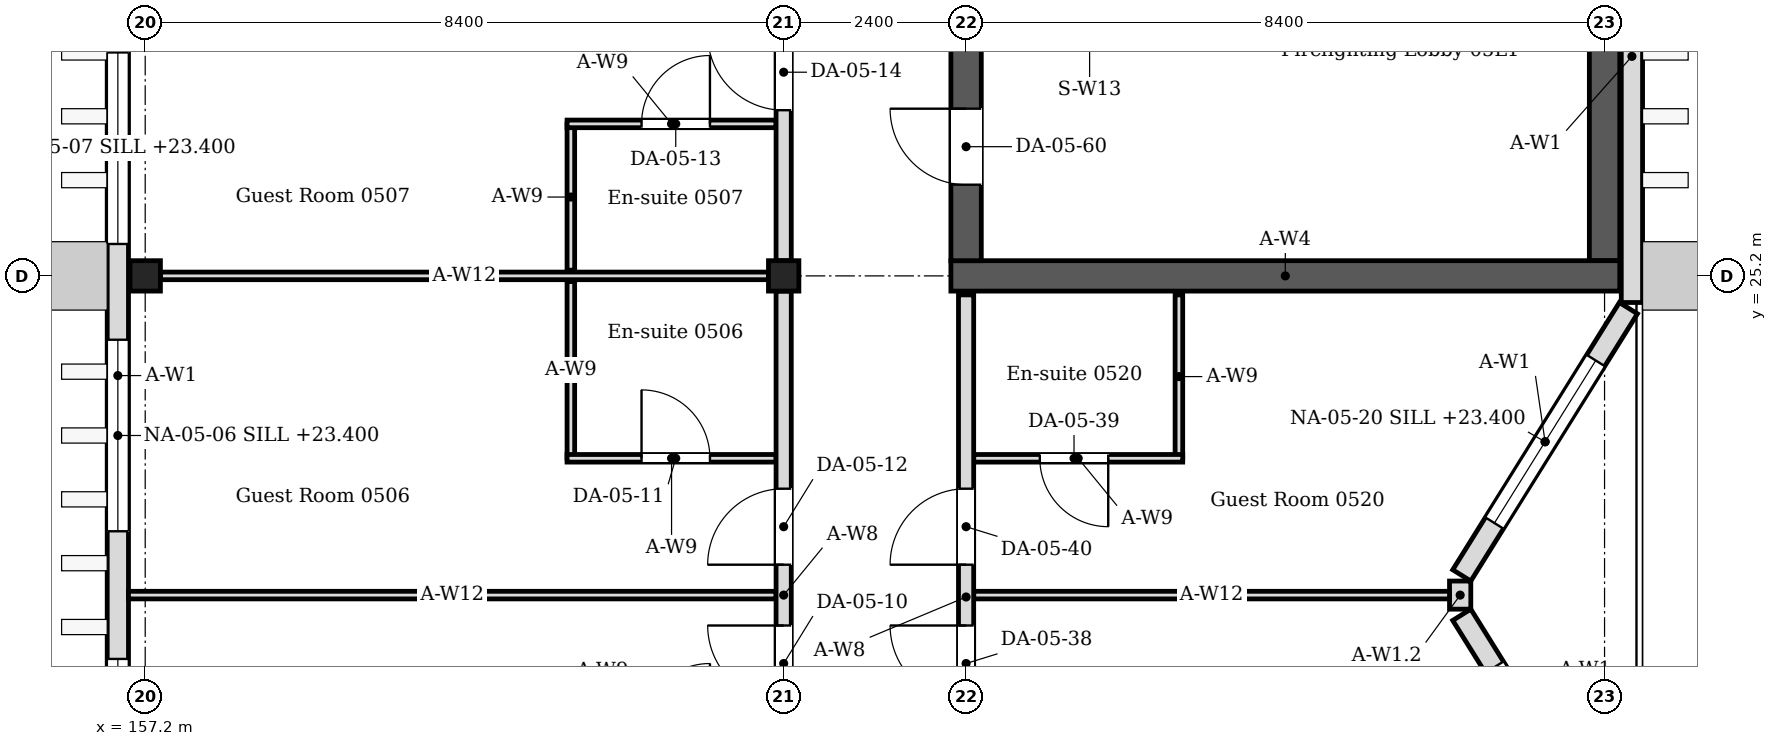
"""IFC4 building model, lengths in metres.
Left out: names, types, materials, properties, quantities, classifications, styles, units other than length and angle.
Written with IfcOpenShell. Run it as: python <this file> out.ifc"""

import sys

from ifc_helpers import new_model, si_unit, direction, frame, frame_2d, origin, origin_2d, place, context, subcontext, project, spatial, rectangle, i_section, extrude, element, fill, save


model = new_model("IFC4")
c1 = context("Model", 3, precision=1e-05, world=origin(), true_north=direction((0.0, 1.0)))
c2 = subcontext(c1, "Body", "Model", "MODEL_VIEW")
j1 = project(units=[si_unit("LENGTHUNIT", "METRE"), si_unit("PLANEANGLEUNIT", "RADIAN")], contexts=[c1])
p1 = place(None, origin())
s1 = spatial("IfcSite", under=j1, at=p1, CompositionType="ELEMENT")
p2 = place(p1, origin())
s2 = spatial("IfcBuilding", under=s1, at=p2, CompositionType="ELEMENT")
p3 = place(p2, frame((0.0, 0.0, 22.8)))
s3 = spatial("IfcBuildingStorey", under=s2, at=p3, CompositionType="ELEMENT", Elevation=22.8)
for number, where, z_axis, x_axis in (
    (1, (157.2, 25.2, 0.0), (0.0, 0.0, 1.0), (1.0, 0.0, 0.0)),
    (2, (165.6, 25.2, 0.0), (0.0, 0.0, 1.0), (1.0, 0.0, 0.0)),
):
    element("IfcColumn", number, at=place(p3, frame(where, z_axis=z_axis, x_axis=x_axis)), inside=s3, PredefinedType="COLUMN", context=c2, shape_type="SweptSolid", body=[
        extrude(i_section(OverallWidth=0.4, OverallDepth=0.4, WebThickness=0.013, FlangeThickness=0.021, FilletRadius=0.022, at=origin_2d()), origin(), (0.0, 0.0, 1.0), 4.2),
    ])
p4 = place(p3, frame((167.8, 25.2, 0.0), z_axis=(0.0, 0.0, 1.0), x_axis=(1.0, 0.0, 0.0)))
e3 = element("IfcWall", 3, at=p4, inside=s3, PredefinedType="SOLIDWALL", context=c2, shape_type="SweptSolid", body=[
    extrude(rectangle(XDim=8.8, YDim=0.4, at=frame_2d((4.4, 0.0))), origin(), (0.0, 0.0, 1.0), 4.05),
])
p5 = place(p3, frame((168.0, 25.4, 0.0), z_axis=(0.0, 0.0, 1.0), x_axis=(0.0, 1.0, 0.0)))
e4 = element("IfcWall", 4, at=p5, inside=s3, PredefinedType="SOLIDWALL", context=c2, shape_type="SweptSolid", body=[
    extrude(rectangle(XDim=16.4, YDim=0.4, at=frame_2d((8.2, 0.0))), origin(), (0.0, 0.0, 1.0), 4.05),
])
p6 = place(p5, frame((1.0, 0.0, 0.0)))
e5 = element("IfcOpeningElement", 5, at=p6, cuts=e4, PredefinedType="OPENING", context=c2, shape_type="SweptSolid", body=[
    extrude(rectangle(XDim=1.0, YDim=2.1, at=frame_2d((0.5, 1.05))), frame((0.0, 0.21, 0.0), z_axis=(0.0, -1.0, 0.0), x_axis=(1.0, 0.0, 0.0)), (0.0, 0.0, 1.0), 0.42),
])
p7 = place(p5, frame((14.4, 0.0, 0.0)))
e6 = element("IfcOpeningElement", 6, at=p7, cuts=e4, PredefinedType="OPENING", context=c2, shape_type="SweptSolid", body=[
    extrude(rectangle(XDim=1.4, YDim=2.1, at=frame_2d((0.7, 1.05))), frame((0.0, 0.21, 0.0), z_axis=(0.0, -1.0, 0.0), x_axis=(1.0, 0.0, 0.0)), (0.0, 0.0, 1.0), 0.42),
])
p8 = place(p3, frame((176.4, 25.4, 0.0), z_axis=(0.0, 0.0, 1.0), x_axis=(0.0, 1.0, 0.0)))
e7 = element("IfcWall", 7, at=p8, inside=s3, PredefinedType="SOLIDWALL", context=c2, shape_type="SweptSolid", body=[
    extrude(rectangle(XDim=16.4, YDim=0.4, at=frame_2d((8.2, 0.0))), origin(), (0.0, 0.0, 1.0), 4.05),
])
p9 = place(p3, frame((156.84, 16.45, 0.0), z_axis=(0.0, 0.0, 1.0), x_axis=(0.0, 1.0, 0.0)))
e8 = element("IfcWall", 8, at=p9, inside=s3, PredefinedType="SOLIDWALL", context=c2, shape_type="SweptSolid", body=[
    extrude(rectangle(XDim=25.9, YDim=0.28, at=frame_2d((12.95, 0.0))), origin(), (0.0, 0.0, 1.0), 4.05),
])
p10 = place(p9, frame((1.19, 0.0, 0.6)))
e9 = element("IfcOpeningElement", 9, at=p10, cuts=e8, PredefinedType="OPENING", context=c2, shape_type="SweptSolid", body=[
    extrude(rectangle(XDim=2.52, YDim=2.4, at=frame_2d((1.26, 1.2))), frame((0.0, 0.15, 0.0), z_axis=(0.0, -1.0, 0.0), x_axis=(1.0, 0.0, 0.0)), (0.0, 0.0, 1.0), 0.3),
])
p11 = place(p9, frame((5.39, 0.0, 0.6)))
e10 = element("IfcOpeningElement", 10, at=p11, cuts=e8, PredefinedType="OPENING", context=c2, shape_type="SweptSolid", body=[
    extrude(rectangle(XDim=2.52, YDim=2.4, at=frame_2d((1.26, 1.2))), frame((0.0, 0.15, 0.0), z_axis=(0.0, -1.0, 0.0), x_axis=(1.0, 0.0, 0.0)), (0.0, 0.0, 1.0), 0.3),
])
p12 = place(p9, frame((9.17, 0.0, 0.6)))
e11 = element("IfcOpeningElement", 11, at=p12, cuts=e8, PredefinedType="OPENING", context=c2, shape_type="SweptSolid", body=[
    extrude(rectangle(XDim=2.52, YDim=2.4, at=frame_2d((1.26, 1.2))), frame((0.0, 0.15, 0.0), z_axis=(0.0, -1.0, 0.0), x_axis=(1.0, 0.0, 0.0)), (0.0, 0.0, 1.0), 0.3),
])
p13 = place(p9, frame((13.37, 0.0, 0.6)))
e12 = element("IfcOpeningElement", 12, at=p13, cuts=e8, PredefinedType="OPENING", context=c2, shape_type="SweptSolid", body=[
    extrude(rectangle(XDim=2.52, YDim=2.4, at=frame_2d((1.26, 1.2))), frame((0.0, 0.15, 0.0), z_axis=(0.0, -1.0, 0.0), x_axis=(1.0, 0.0, 0.0)), (0.0, 0.0, 1.0), 0.3),
])
p14 = place(p9, frame((17.57, 0.0, 0.6)))
e13 = element("IfcOpeningElement", 13, at=p14, cuts=e8, PredefinedType="OPENING", context=c2, shape_type="SweptSolid", body=[
    extrude(rectangle(XDim=2.52, YDim=2.4, at=frame_2d((1.26, 1.2))), frame((0.0, 0.15, 0.0), z_axis=(0.0, -1.0, 0.0), x_axis=(1.0, 0.0, 0.0)), (0.0, 0.0, 1.0), 0.3),
])
p15 = place(p9, frame((21.77, 0.0, 0.6)))
e14 = element("IfcOpeningElement", 14, at=p15, cuts=e8, PredefinedType="OPENING", context=c2, shape_type="SweptSolid", body=[
    extrude(rectangle(XDim=2.52, YDim=2.4, at=frame_2d((1.26, 1.2))), frame((0.0, 0.15, 0.0), z_axis=(0.0, -1.0, 0.0), x_axis=(1.0, 0.0, 0.0)), (0.0, 0.0, 1.0), 0.3),
])
p16 = place(p3, frame((176.714, 17.224, 0.0), z_axis=(0.0, 0.0, 1.0), x_axis=(-0.529018946142, 0.848610013271, 0.0)))
e15 = element("IfcWall", 15, at=p16, inside=s3, PredefinedType="SOLIDWALL", context=c2, shape_type="SweptSolid", body=[
    extrude(rectangle(XDim=4.144, YDim=0.28, at=frame_2d((2.072, 0.0))), origin(), (0.0, 0.0, 1.0), 4.05),
])
p17 = place(p16, frame((0.812, 0.0, 0.6)))
e16 = element("IfcOpeningElement", 16, at=p17, cuts=e15, PredefinedType="OPENING", context=c2, shape_type="SweptSolid", body=[
    extrude(rectangle(XDim=2.52, YDim=2.4, at=frame_2d((1.26, 1.2))), frame((0.0, 0.15, 0.0), z_axis=(0.0, -1.0, 0.0), x_axis=(1.0, 0.0, 0.0)), (0.0, 0.0, 1.0), 0.3),
])
p18 = place(p3, frame((174.521, 21.259, 0.0), z_axis=(0.0, 0.0, 1.0), x_axis=(0.529018946142, 0.848610013271, 0.0)))
e17 = element("IfcWall", 17, at=p18, inside=s3, PredefinedType="SOLIDWALL", context=c2, shape_type="SweptSolid", body=[
    extrude(rectangle(XDim=4.144, YDim=0.28, at=frame_2d((2.072, 0.0))), origin(), (0.0, 0.0, 1.0), 4.05),
])
p19 = place(p18, frame((0.812, 0.0, 0.6)))
e18 = element("IfcOpeningElement", 18, at=p19, cuts=e17, PredefinedType="OPENING", context=c2, shape_type="SweptSolid", body=[
    extrude(rectangle(XDim=2.52, YDim=2.4, at=frame_2d((1.26, 1.2))), frame((0.0, 0.15, 0.0), z_axis=(0.0, -1.0, 0.0), x_axis=(1.0, 0.0, 0.0)), (0.0, 0.0, 1.0), 0.3),
])
p20 = place(p3, frame((174.5, 20.815, 0.0), z_axis=(0.0, 0.0, 1.0), x_axis=(0.0, 1.0, 0.0)))
e19 = element("IfcWall", 19, at=p20, inside=s3, PredefinedType="SOLIDWALL", context=c2, shape_type="SweptSolid", body=[
    extrude(rectangle(XDim=0.37, YDim=0.28, at=frame_2d((0.185, 0.0))), origin(), (0.0, 0.0, 1.0), 3.604),
])
p21 = place(p3, frame((176.76, 24.85, 0.0), z_axis=(0.0, 0.0, 1.0), x_axis=(0.0, 1.0, 0.0)))
e20 = element("IfcWall", 20, at=p21, inside=s3, PredefinedType="SOLIDWALL", context=c2, shape_type="SweptSolid", body=[
    extrude(rectangle(XDim=42.57, YDim=0.28, at=frame_2d((21.285, 0.0))), origin(), (0.0, 0.0, 1.0), 4.05),
])
p22 = place(p21, frame((18.41, 0.0, 0.6)))
e21 = element("IfcOpeningElement", 21, at=p22, cuts=e20, PredefinedType="OPENING", context=c2, shape_type="SweptSolid", body=[
    extrude(rectangle(XDim=2.52, YDim=2.4, at=frame_2d((1.26, 1.2))), frame((0.0, 0.15, 0.0), z_axis=(0.0, -1.0, 0.0), x_axis=(1.0, 0.0, 0.0)), (0.0, 0.0, 1.0), 0.3),
])
p23 = place(p21, frame((22.61, 0.0, 0.6)))
e22 = element("IfcOpeningElement", 22, at=p23, cuts=e20, PredefinedType="OPENING", context=c2, shape_type="SweptSolid", body=[
    extrude(rectangle(XDim=2.52, YDim=2.4, at=frame_2d((1.26, 1.2))), frame((0.0, 0.15, 0.0), z_axis=(0.0, -1.0, 0.0), x_axis=(1.0, 0.0, 0.0)), (0.0, 0.0, 1.0), 0.3),
])
p24 = place(p21, frame((26.81, 0.0, 0.6)))
e23 = element("IfcOpeningElement", 23, at=p24, cuts=e20, PredefinedType="OPENING", context=c2, shape_type="SweptSolid", body=[
    extrude(rectangle(XDim=2.52, YDim=2.4, at=frame_2d((1.26, 1.2))), frame((0.0, 0.15, 0.0), z_axis=(0.0, -1.0, 0.0), x_axis=(1.0, 0.0, 0.0)), (0.0, 0.0, 1.0), 0.3),
])
p25 = place(p21, frame((31.01, 0.0, 0.6)))
e24 = element("IfcOpeningElement", 24, at=p25, cuts=e20, PredefinedType="OPENING", context=c2, shape_type="SweptSolid", body=[
    extrude(rectangle(XDim=2.52, YDim=2.4, at=frame_2d((1.26, 1.2))), frame((0.0, 0.15, 0.0), z_axis=(0.0, -1.0, 0.0), x_axis=(1.0, 0.0, 0.0)), (0.0, 0.0, 1.0), 0.3),
])
p26 = place(p3, frame((162.8, 22.8, 0.0), z_axis=(0.0, 0.0, 1.0), x_axis=(0.0, 1.0, 0.0)))
e25 = element("IfcWall", 25, at=p26, inside=s3, PredefinedType="PARTITIONING", context=c2, shape_type="SweptSolid", body=[
    extrude(rectangle(XDim=2.325, YDim=0.1, at=frame_2d((1.163, 0.0))), origin(), (0.0, 0.0, 1.0), 4.05),
])
p27 = place(p3, frame((162.75, 22.8, 0.0), z_axis=(0.0, 0.0, 1.0), x_axis=(1.0, 0.0, 0.0)))
e26 = element("IfcWall", 26, at=p27, inside=s3, PredefinedType="PARTITIONING", context=c2, shape_type="SweptSolid", body=[
    extrude(rectangle(XDim=2.75, YDim=0.1, at=frame_2d((1.375, 0.0))), origin(), (0.0, 0.0, 1.0), 4.05),
])
p28 = place(p27, frame((0.98, 0.0, 0.0)))
e27 = element("IfcOpeningElement", 27, at=p28, cuts=e26, PredefinedType="OPENING", context=c2, shape_type="SweptSolid", body=[
    extrude(rectangle(XDim=0.9, YDim=2.1, at=frame_2d((0.45, 1.05))), frame((0.0, 0.06, 0.0), z_axis=(0.0, -1.0, 0.0), x_axis=(1.0, 0.0, 0.0)), (0.0, 0.0, 1.0), 0.12),
])
p29 = place(p3, frame((162.8, 25.275, 0.0), z_axis=(0.0, 0.0, 1.0), x_axis=(0.0, 1.0, 0.0)))
e28 = element("IfcWall", 28, at=p29, inside=s3, PredefinedType="PARTITIONING", context=c2, shape_type="SweptSolid", body=[
    extrude(rectangle(XDim=1.925, YDim=0.1, at=frame_2d((0.962, 0.0))), origin(), (0.0, 0.0, 1.0), 4.05),
])
p30 = place(p3, frame((162.75, 27.2, 0.0), z_axis=(0.0, 0.0, 1.0), x_axis=(1.0, 0.0, 0.0)))
e29 = element("IfcWall", 29, at=p30, inside=s3, PredefinedType="PARTITIONING", context=c2, shape_type="SweptSolid", body=[
    extrude(rectangle(XDim=2.75, YDim=0.1, at=frame_2d((1.375, 0.0))), origin(), (0.0, 0.0, 1.0), 4.05),
])
p31 = place(p30, frame((0.98, 0.0, 0.0)))
e30 = element("IfcOpeningElement", 30, at=p31, cuts=e29, PredefinedType="OPENING", context=c2, shape_type="SweptSolid", body=[
    extrude(rectangle(XDim=0.9, YDim=2.1, at=frame_2d((0.45, 1.05))), frame((0.0, 0.06, 0.0), z_axis=(0.0, -1.0, 0.0), x_axis=(1.0, 0.0, 0.0)), (0.0, 0.0, 1.0), 0.12),
])
p32 = place(p3, frame((170.8, 22.8, 0.0), z_axis=(0.0, 0.0, 1.0), x_axis=(0.0, 1.0, 0.0)))
e31 = element("IfcWall", 31, at=p32, inside=s3, PredefinedType="PARTITIONING", context=c2, shape_type="SweptSolid", body=[
    extrude(rectangle(XDim=2.15, YDim=0.1, at=frame_2d((1.075, 0.0))), origin(), (0.0, 0.0, 1.0), 4.05),
])
p33 = place(p3, frame((170.85, 22.8, 0.0), z_axis=(0.0, 0.0, 1.0), x_axis=(-1.0, 0.0, 0.0)))
e32 = element("IfcWall", 32, at=p33, inside=s3, PredefinedType="PARTITIONING", context=c2, shape_type="SweptSolid", body=[
    extrude(rectangle(XDim=2.75, YDim=0.1, at=frame_2d((1.375, 0.0))), origin(), (0.0, 0.0, 1.0), 4.05),
])
p34 = place(p33, frame((0.98, 0.0, 0.0)))
e33 = element("IfcOpeningElement", 33, at=p34, cuts=e32, PredefinedType="OPENING", context=c2, shape_type="SweptSolid", body=[
    extrude(rectangle(XDim=0.9, YDim=2.1, at=frame_2d((0.45, 1.05))), frame((0.0, 0.06, 0.0), z_axis=(0.0, -1.0, 0.0), x_axis=(1.0, 0.0, 0.0)), (0.0, 0.0, 1.0), 0.12),
])
p35 = place(p3, frame((157.4, 25.2, 0.0), z_axis=(0.0, 0.0, 1.0), x_axis=(1.0, 0.0, 0.0)))
e34 = element("IfcWall", 34, at=p35, inside=s3, PredefinedType="PARTITIONING", context=c2, shape_type="SweptSolid", body=[
    extrude(rectangle(XDim=8.0, YDim=0.1, at=frame_2d((4.0, 0.0))), origin(), (0.0, 0.0, 1.0), 3.604),
])
p36 = place(p3, frame((156.98, 21.0, 0.0), z_axis=(0.0, 0.0, 1.0), x_axis=(1.0, 0.0, 0.0)))
e35 = element("IfcWall", 35, at=p36, inside=s3, PredefinedType="PARTITIONING", context=c2, shape_type="SweptSolid", body=[
    extrude(rectangle(XDim=8.52, YDim=0.1, at=frame_2d((4.26, 0.0))), origin(), (0.0, 0.0, 1.0), 3.604),
])
p37 = place(p3, frame((168.1, 21.0, 0.0), z_axis=(0.0, 0.0, 1.0), x_axis=(1.0, 0.0, 0.0)))
e36 = element("IfcWall", 36, at=p37, inside=s3, PredefinedType="PARTITIONING", context=c2, shape_type="SweptSolid", body=[
    extrude(rectangle(XDim=6.26, YDim=0.1, at=frame_2d((3.13, 0.0))), origin(), (0.0, 0.0, 1.0), 3.604),
])
p38 = place(p3, frame((165.6, 17.0, 0.0), z_axis=(0.0, 0.0, 1.0), x_axis=(0.0, 1.0, 0.0)))
e37 = element("IfcWall", 37, at=p38, inside=s3, PredefinedType="PARTITIONING", context=c2, shape_type="SweptSolid", body=[
    extrude(rectangle(XDim=8.0, YDim=0.2, at=frame_2d((4.0, 0.0))), origin(), (0.0, 0.0, 1.0), 3.45),
])
p39 = place(p38, frame((2.6, 0.0, 0.0)))
e38 = element("IfcOpeningElement", 38, at=p39, cuts=e37, PredefinedType="OPENING", context=c2, shape_type="SweptSolid", body=[
    extrude(rectangle(XDim=1.0, YDim=2.4, at=frame_2d((0.5, 1.2))), frame((0.0, 0.11, 0.0), z_axis=(0.0, -1.0, 0.0), x_axis=(1.0, 0.0, 0.0)), (0.0, 0.0, 1.0), 0.22),
])
p40 = place(p38, frame((4.4, 0.0, 0.0)))
e39 = element("IfcOpeningElement", 39, at=p40, cuts=e37, PredefinedType="OPENING", context=c2, shape_type="SweptSolid", body=[
    extrude(rectangle(XDim=1.0, YDim=2.4, at=frame_2d((0.5, 1.2))), frame((0.0, 0.11, 0.0), z_axis=(0.0, -1.0, 0.0), x_axis=(1.0, 0.0, 0.0)), (0.0, 0.0, 1.0), 0.22),
])
p41 = place(p3, frame((165.6, 25.4, 0.0), z_axis=(0.0, 0.0, 1.0), x_axis=(0.0, 1.0, 0.0)))
e40 = element("IfcWall", 40, at=p41, inside=s3, PredefinedType="PARTITIONING", context=c2, shape_type="SweptSolid", body=[
    extrude(rectangle(XDim=8.0, YDim=0.2, at=frame_2d((4.0, 0.0))), origin(), (0.0, 0.0, 1.0), 3.45),
])
p42 = place(p41, frame((1.98, 0.0, 0.0)))
e41 = element("IfcOpeningElement", 41, at=p42, cuts=e40, PredefinedType="OPENING", context=c2, shape_type="SweptSolid", body=[
    extrude(rectangle(XDim=1.0, YDim=2.4, at=frame_2d((0.5, 1.2))), frame((0.0, 0.11, 0.0), z_axis=(0.0, -1.0, 0.0), x_axis=(1.0, 0.0, 0.0)), (0.0, 0.0, 1.0), 0.22),
])
p43 = place(p41, frame((3.98, 0.0, 0.0)))
e42 = element("IfcOpeningElement", 42, at=p43, cuts=e40, PredefinedType="OPENING", context=c2, shape_type="SweptSolid", body=[
    extrude(rectangle(XDim=1.0, YDim=2.4, at=frame_2d((0.5, 1.2))), frame((0.0, 0.11, 0.0), z_axis=(0.0, -1.0, 0.0), x_axis=(1.0, 0.0, 0.0)), (0.0, 0.0, 1.0), 0.22),
])
p44 = place(p3, frame((168.0, 17.0, 0.0), z_axis=(0.0, 0.0, 1.0), x_axis=(0.0, 1.0, 0.0)))
e43 = element("IfcWall", 43, at=p44, inside=s3, PredefinedType="PARTITIONING", context=c2, shape_type="SweptSolid", body=[
    extrude(rectangle(XDim=7.95, YDim=0.2, at=frame_2d((3.975, 0.0))), origin(), (0.0, 0.0, 1.0), 3.45),
])
p45 = place(p44, frame((2.6, 0.0, 0.0)))
e44 = element("IfcOpeningElement", 44, at=p45, cuts=e43, PredefinedType="OPENING", context=c2, shape_type="SweptSolid", body=[
    extrude(rectangle(XDim=1.0, YDim=2.4, at=frame_2d((0.5, 1.2))), frame((0.0, 0.11, 0.0), z_axis=(0.0, -1.0, 0.0), x_axis=(1.0, 0.0, 0.0)), (0.0, 0.0, 1.0), 0.22),
])
p46 = place(p44, frame((4.4, 0.0, 0.0)))
e45 = element("IfcOpeningElement", 45, at=p46, cuts=e43, PredefinedType="OPENING", context=c2, shape_type="SweptSolid", body=[
    extrude(rectangle(XDim=1.0, YDim=2.4, at=frame_2d((0.5, 1.2))), frame((0.0, 0.11, 0.0), z_axis=(0.0, -1.0, 0.0), x_axis=(1.0, 0.0, 0.0)), (0.0, 0.0, 1.0), 0.22),
])
p47 = place(p10, origin())
e46 = element("IfcWindow", 46, at=p47, inside=s3, PartitioningType="SINGLE_PANEL", PredefinedType="WINDOW", context=c2, shape_type="SweptSolid", body=[
    extrude(rectangle(XDim=2.52, YDim=2.4, at=frame_2d((1.26, 1.2))), frame((0.0, 0.03, 0.0), z_axis=(0.0, -1.0, 0.0), x_axis=(1.0, 0.0, 0.0)), (0.0, 0.0, 1.0), 0.06),
])
fill(e9, e46)
p48 = place(p11, origin())
e47 = element("IfcWindow", 47, at=p48, inside=s3, PartitioningType="SINGLE_PANEL", PredefinedType="WINDOW", context=c2, shape_type="SweptSolid", body=[
    extrude(rectangle(XDim=2.52, YDim=2.4, at=frame_2d((1.26, 1.2))), frame((0.0, 0.03, 0.0), z_axis=(0.0, -1.0, 0.0), x_axis=(1.0, 0.0, 0.0)), (0.0, 0.0, 1.0), 0.06),
])
fill(e10, e47)
p49 = place(p12, origin())
e48 = element("IfcWindow", 48, at=p49, inside=s3, PartitioningType="SINGLE_PANEL", PredefinedType="WINDOW", context=c2, shape_type="SweptSolid", body=[
    extrude(rectangle(XDim=2.52, YDim=2.4, at=frame_2d((1.26, 1.2))), frame((0.0, 0.03, 0.0), z_axis=(0.0, -1.0, 0.0), x_axis=(1.0, 0.0, 0.0)), (0.0, 0.0, 1.0), 0.06),
])
fill(e11, e48)
p50 = place(p19, origin())
e49 = element("IfcWindow", 49, at=p50, inside=s3, PartitioningType="SINGLE_PANEL", PredefinedType="WINDOW", context=c2, shape_type="SweptSolid", body=[
    extrude(rectangle(XDim=2.52, YDim=2.4, at=frame_2d((1.26, 1.2))), frame((0.0, 0.03, 0.0), z_axis=(0.0, -1.0, 0.0), x_axis=(1.0, 0.0, 0.0)), (0.0, 0.0, 1.0), 0.06),
])
fill(e18, e49)
p51 = place(p39, origin())
e50 = element("IfcDoor", 50, at=p51, inside=s3, OperationType="SINGLE_SWING_RIGHT", PredefinedType="DOOR", context=c2, shape_type="SweptSolid", body=[
    extrude(rectangle(XDim=1.0, YDim=2.4, at=frame_2d((0.5, 1.2))), frame((0.0, 0.025, 0.0), z_axis=(0.0, -1.0, 0.0), x_axis=(1.0, 0.0, 0.0)), (0.0, 0.0, 1.0), 0.05),
])
fill(e38, e50)
p52 = place(p28, origin())
e51 = element("IfcDoor", 51, at=p52, inside=s3, OperationType="SINGLE_SWING_LEFT", PredefinedType="DOOR", context=c2, shape_type="SweptSolid", body=[
    extrude(rectangle(XDim=0.9, YDim=2.1, at=frame_2d((0.45, 1.05))), frame((0.0, 0.025, 0.0), z_axis=(0.0, -1.0, 0.0), x_axis=(1.0, 0.0, 0.0)), (0.0, 0.0, 1.0), 0.05),
])
fill(e27, e51)
p53 = place(p40, origin())
e52 = element("IfcDoor", 52, at=p53, inside=s3, OperationType="SINGLE_SWING_LEFT", PredefinedType="DOOR", context=c2, shape_type="SweptSolid", body=[
    extrude(rectangle(XDim=1.0, YDim=2.4, at=frame_2d((0.5, 1.2))), frame((0.0, 0.025, 0.0), z_axis=(0.0, -1.0, 0.0), x_axis=(1.0, 0.0, 0.0)), (0.0, 0.0, 1.0), 0.05),
])
fill(e39, e52)
p54 = place(p31, origin())
e53 = element("IfcDoor", 53, at=p54, inside=s3, OperationType="SINGLE_SWING_RIGHT", PredefinedType="DOOR", context=c2, shape_type="SweptSolid", body=[
    extrude(rectangle(XDim=0.9, YDim=2.1, at=frame_2d((0.45, 1.05))), frame((0.0, 0.025, 0.0), z_axis=(0.0, -1.0, 0.0), x_axis=(1.0, 0.0, 0.0)), (0.0, 0.0, 1.0), 0.05),
])
fill(e30, e53)
p55 = place(p42, origin())
e54 = element("IfcDoor", 54, at=p55, inside=s3, OperationType="SINGLE_SWING_RIGHT", PredefinedType="DOOR", context=c2, shape_type="SweptSolid", body=[
    extrude(rectangle(XDim=1.0, YDim=2.4, at=frame_2d((0.5, 1.2))), frame((0.0, 0.025, 0.0), z_axis=(0.0, -1.0, 0.0), x_axis=(1.0, 0.0, 0.0)), (0.0, 0.0, 1.0), 0.05),
])
fill(e41, e54)
p56 = place(p45, origin())
e55 = element("IfcDoor", 55, at=p56, inside=s3, OperationType="SINGLE_SWING_RIGHT", PredefinedType="DOOR", context=c2, shape_type="SweptSolid", body=[
    extrude(rectangle(XDim=1.0, YDim=2.4, at=frame_2d((0.5, 1.2))), frame((0.0, 0.025, 0.0), z_axis=(0.0, -1.0, 0.0), x_axis=(1.0, 0.0, 0.0)), (0.0, 0.0, 1.0), 0.05),
])
fill(e44, e55)
p57 = place(p34, origin())
e56 = element("IfcDoor", 56, at=p57, inside=s3, OperationType="SINGLE_SWING_LEFT", PredefinedType="DOOR", context=c2, shape_type="SweptSolid", body=[
    extrude(rectangle(XDim=0.9, YDim=2.1, at=frame_2d((0.45, 1.05))), frame((0.0, 0.025, 0.0), z_axis=(0.0, -1.0, 0.0), x_axis=(1.0, 0.0, 0.0)), (0.0, 0.0, 1.0), 0.05),
])
fill(e33, e56)
p58 = place(p46, origin())
e57 = element("IfcDoor", 57, at=p58, inside=s3, OperationType="SINGLE_SWING_LEFT", PredefinedType="DOOR", context=c2, shape_type="SweptSolid", body=[
    extrude(rectangle(XDim=1.0, YDim=2.4, at=frame_2d((0.5, 1.2))), frame((0.0, 0.025, 0.0), z_axis=(0.0, -1.0, 0.0), x_axis=(1.0, 0.0, 0.0)), (0.0, 0.0, 1.0), 0.05),
])
fill(e45, e57)
p59 = place(p6, origin())
e58 = element("IfcDoor", 58, at=p59, inside=s3, OperationType="SINGLE_SWING_RIGHT", PredefinedType="DOOR", context=c2, shape_type="SweptSolid", body=[
    extrude(rectangle(XDim=1.0, YDim=2.1, at=frame_2d((0.5, 1.05))), frame((0.0, 0.025, 0.0), z_axis=(0.0, -1.0, 0.0), x_axis=(1.0, 0.0, 0.0)), (0.0, 0.0, 1.0), 0.05),
])
fill(e5, e58)
save(model, sys.argv[1])
